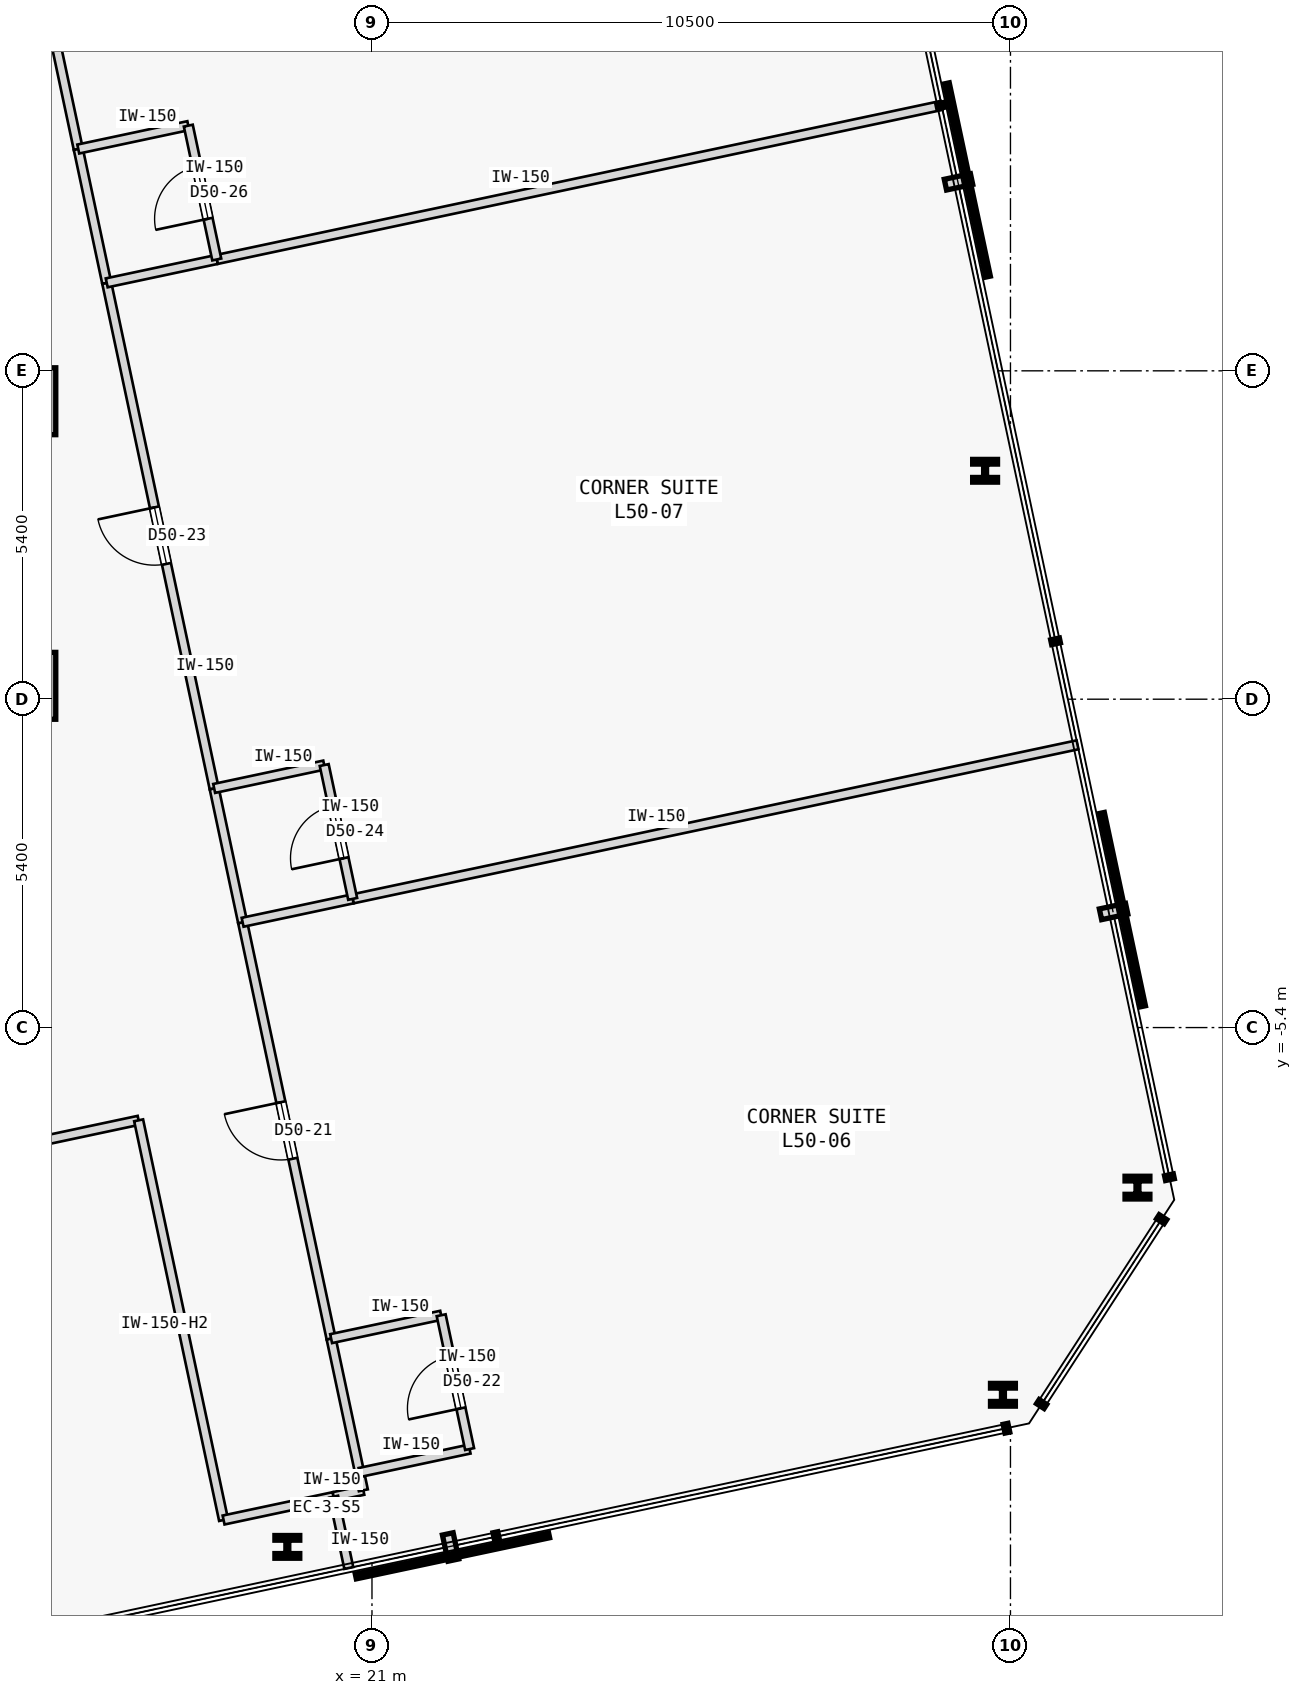
"""IFC4 building model, lengths in metres.
Left out: names, types, materials, properties, quantities, classifications, styles, units other than length and angle.
Written with IfcOpenShell. Run it as: python <this file> out.ifc"""

import sys

from ifc_helpers import new_model, si_unit, direction, frame, frame_2d, origin, origin_2d, place, context, subcontext, project, spatial, rectangle, i_section, extrude, element, fill, save


model = new_model("IFC4")
c1 = context("Model", 3, precision=1e-05, world=origin(), true_north=direction((0.0, 1.0)))
c2 = subcontext(c1, "Body", "Model", "MODEL_VIEW")
j1 = project(units=[si_unit("LENGTHUNIT", "METRE"), si_unit("PLANEANGLEUNIT", "RADIAN")], contexts=[c1])
p1 = place(None, origin())
s1 = spatial("IfcSite", under=j1, at=p1, CompositionType="ELEMENT")
p2 = place(p1, origin())
s2 = spatial("IfcBuilding", under=s1, at=p2, CompositionType="ELEMENT")
p3 = place(p2, frame((0.0, 0.0, 192.2)))
s3 = spatial("IfcBuildingStorey", under=s2, at=p3, CompositionType="ELEMENT", Elevation=192.2)
for number, where, z_axis, x_axis in (
    (1, (15.25, 4.9, 0.0), (0.0, 0.0, 1.0), (1.0, 0.0, 0.0)),
    (2, (15.25, 0.22, 0.0), (0.0, 0.0, 1.0), (1.0, 0.0, 0.0)),
):
    element("IfcColumn", number, at=place(p3, frame(where, z_axis=z_axis, x_axis=x_axis)), inside=s3, PredefinedType="COLUMN", context=c2, shape_type="SweptSolid", body=[
        extrude(rectangle(XDim=1.1, YDim=1.1, at=origin_2d()), origin(), (0.0, 0.0, 1.0), 3.4),
    ])
for number, where, z_axis, x_axis in (
    (3, (19.608, -13.94, 0.0), (0.0, 0.0, 1.0), (1.0, 0.0, 0.0)),
    (4, (31.376, -11.439, 0.0), (0.0, 0.0, 1.0), (1.0, 0.0, 0.0)),
    (5, (33.589, -8.032, 0.0), (0.0, 0.0, 1.0), (1.0, 0.0, 0.0)),
    (6, (31.083, 3.756, 0.0), (0.0, 0.0, 1.0), (1.0, 0.0, 0.0)),
):
    element("IfcColumn", number, at=place(p3, frame(where, z_axis=z_axis, x_axis=x_axis)), inside=s3, PredefinedType="COLUMN", context=c2, shape_type="SweptSolid", body=[
        extrude(i_section(OverallWidth=0.409, OverallDepth=0.374, WebThickness=0.048, FlangeThickness=0.077, FilletRadius=0.015, at=origin_2d()), origin(), (0.0, 0.0, 1.0), 3.4),
    ])
p4 = place(p3, frame((-12.862, -13.307, 0.0), z_axis=(0.0, 0.0, 1.0), x_axis=(0.97814793387, 0.207910123527, 0.0)))
e7 = element("IfcWall", 7, at=p4, inside=s3, PredefinedType="PARTITIONING", context=c2, shape_type="SweptSolid", body=[
    extrude(rectangle(XDim=30.695, YDim=0.15, at=frame_2d((15.348, 0.0))), origin(), (0.0, 0.0, 1.0), 3.175),
])
p5 = place(p4, frame((14.887, 0.0, 0.0)))
e8 = element("IfcOpeningElement", 8, at=p5, cuts=e7, PredefinedType="OPENING", context=c2, shape_type="SweptSolid", body=[
    extrude(rectangle(XDim=0.92, YDim=2.15, at=frame_2d((0.46, 1.075))), frame((0.0, 0.085, 0.0), z_axis=(0.0, -1.0, 0.0), x_axis=(1.0, 0.0, 0.0)), (0.0, 0.0, 1.0), 0.17),
])
p6 = place(p3, frame((18.56, -13.498, 0.0), z_axis=(0.0, 0.0, 1.0), x_axis=(-0.207888737749, 0.978152479278, 0.0)))
e9 = element("IfcWall", 9, at=p6, inside=s3, PredefinedType="PARTITIONING", context=c2, shape_type="SweptSolid", body=[
    extrude(rectangle(XDim=6.72, YDim=0.15, at=frame_2d((3.36, 0.0))), origin(), (0.0, 0.0, 1.0), 2.575),
])
p7 = place(p3, frame((18.56, -13.498, 0.0), z_axis=(0.0, 0.0, 1.0), x_axis=(0.978160192495, 0.207852442415, 0.0)))
e10 = element("IfcWall", 10, at=p7, inside=s3, PredefinedType="PARTITIONING", context=c2, shape_type="SweptSolid", body=[
    extrude(rectangle(XDim=1.85, YDim=0.15, at=frame_2d((0.925, 0.0))), origin(), (0.0, 0.0, 1.0), 3.175),
])
p8 = place(p3, frame((20.369, -13.114, 0.0), z_axis=(0.0, 0.0, 1.0), x_axis=(0.978143962546, 0.207928806409, 0.0)))
e11 = element("IfcWall", 11, at=p8, inside=s3, PredefinedType="PARTITIONING", context=c2, shape_type="SweptSolid", body=[
    extrude(rectangle(XDim=0.5, YDim=0.15, at=frame_2d((0.25, 0.0))), origin(), (0.0, 0.0, 1.0), 3.175),
])
p9 = place(p3, frame((20.858, -13.01, 0.0), z_axis=(0.0, 0.0, 1.0), x_axis=(-0.208306395052, 0.978063620518, 0.0)))
e12 = element("IfcWall", 12, at=p9, inside=s3, PredefinedType="PARTITIONING", context=c2, shape_type="SweptSolid", body=[
    extrude(rectangle(XDim=0.3, YDim=0.15, at=frame_2d((0.15, 0.0))), origin(), (0.0, 0.0, 1.0), 3.175),
])
p10 = place(p3, frame((20.328, -10.515, 0.0), z_axis=(0.0, 0.0, 1.0), x_axis=(-0.207906726269, 0.978148655968, 0.0)))
e13 = element("IfcWall", 13, at=p10, inside=s3, PredefinedType="PARTITIONING", context=c2, shape_type="SweptSolid", body=[
    extrude(rectangle(XDim=7.0, YDim=0.15, at=frame_2d((3.5, 0.0))), origin(), (0.0, 0.0, 1.0), 3.175),
])
p11 = place(p10, frame((3.025, 0.0, 0.0)))
e14 = element("IfcOpeningElement", 14, at=p11, cuts=e13, PredefinedType="OPENING", context=c2, shape_type="SweptSolid", body=[
    extrude(rectangle(XDim=0.95, YDim=2.15, at=frame_2d((0.475, 1.075))), frame((0.0, 0.085, 0.0), z_axis=(0.0, -1.0, 0.0), x_axis=(1.0, 0.0, 0.0)), (0.0, 0.0, 1.0), 0.17),
])
p12 = place(p3, frame((20.796, -12.716, 0.0), z_axis=(0.0, 0.0, 1.0), x_axis=(-0.207891197838, 0.978151956427, 0.0)))
e15 = element("IfcWall", 15, at=p12, inside=s3, PredefinedType="PARTITIONING", context=c2, shape_type="SweptSolid", body=[
    extrude(rectangle(XDim=2.25, YDim=0.15, at=frame_2d((1.125, 0.0))), origin(), (0.0, 0.0, 1.0), 3.175),
])
p13 = place(p3, frame((18.405, -1.468, 0.0), z_axis=(0.0, 0.0, 1.0), x_axis=(-0.207888984761, 0.97815242678, 0.0)))
e16 = element("IfcWall", 16, at=p13, inside=s3, PredefinedType="PARTITIONING", context=c2, shape_type="SweptSolid", body=[
    extrude(rectangle(XDim=8.5, YDim=0.15, at=frame_2d((4.25, 0.0))), origin(), (0.0, 0.0, 1.0), 3.175),
])
p14 = place(p13, frame((3.775, 0.0, 0.0)))
e17 = element("IfcOpeningElement", 17, at=p14, cuts=e16, PredefinedType="OPENING", context=c2, shape_type="SweptSolid", body=[
    extrude(rectangle(XDim=0.95, YDim=2.15, at=frame_2d((0.475, 1.075))), frame((0.0, 0.085, 0.0), z_axis=(0.0, -1.0, 0.0), x_axis=(1.0, 0.0, 0.0)), (0.0, 0.0, 1.0), 0.17),
])
p15 = place(p3, frame((18.873, -3.668, 0.0), z_axis=(0.0, 0.0, 1.0), x_axis=(-0.208017083936, 0.9781251928, 0.0)))
e18 = element("IfcWall", 18, at=p15, inside=s3, PredefinedType="PARTITIONING", context=c2, shape_type="SweptSolid", body=[
    extrude(rectangle(XDim=2.25, YDim=0.15, at=frame_2d((1.125, 0.0))), origin(), (0.0, 0.0, 1.0), 3.175),
])
p16 = place(p3, frame((16.17, 9.047, 0.0), z_axis=(0.0, 0.0, 1.0), x_axis=(-0.2079164651, 0.978146585917, 0.0)))
e19 = element("IfcWall", 19, at=p16, inside=s3, PredefinedType="PARTITIONING", context=c2, shape_type="SweptSolid", body=[
    extrude(rectangle(XDim=8.5, YDim=0.15, at=frame_2d((4.25, 0.0))), origin(), (0.0, 0.0, 1.0), 3.175),
])
p17 = place(p16, frame((3.775, 0.0, 0.0)))
e20 = element("IfcOpeningElement", 20, at=p17, cuts=e19, PredefinedType="OPENING", context=c2, shape_type="SweptSolid", body=[
    extrude(rectangle(XDim=0.95, YDim=2.15, at=frame_2d((0.475, 1.075))), frame((0.0, 0.085, 0.0), z_axis=(0.0, -1.0, 0.0), x_axis=(1.0, 0.0, 0.0)), (0.0, 0.0, 1.0), 0.17),
])
p18 = place(p3, frame((16.638, 6.847, 0.0), z_axis=(0.0, 0.0, 1.0), x_axis=(-0.207913264065, 0.978147266328, 0.0)))
e21 = element("IfcWall", 21, at=p18, inside=s3, PredefinedType="PARTITIONING", context=c2, shape_type="SweptSolid", body=[
    extrude(rectangle(XDim=2.25, YDim=0.15, at=frame_2d((1.125, 0.0))), origin(), (0.0, 0.0, 1.0), 3.175),
])
p19 = place(p3, frame((20.619, -14.288, 0.0), z_axis=(0.0, 0.0, 1.0), x_axis=(-0.207917150959, 0.978146440129, 0.0)))
e22 = element("IfcWall", 22, at=p19, inside=s3, PredefinedType="PARTITIONING", context=c2, shape_type="SweptSolid", body=[
    extrude(rectangle(XDim=1.2, YDim=0.15, at=frame_2d((0.6, 0.0))), origin(), (0.0, 0.0, 1.0), 3.175),
])
for number, where, z_axis, x_axis in (
    (23, (20.796, -12.716, 0.0), (0.0, 0.0, 1.0), (0.978, 0.208, 0.0)),
    (24, (20.328, -10.515, 0.0), (0.0, 0.0, 1.0), (0.978, 0.208, 0.0)),
):
    element("IfcWall", number, at=place(p3, frame(where, z_axis=z_axis, x_axis=x_axis)), inside=s3, PredefinedType="PARTITIONING", context=c2, shape_type="SweptSolid", body=[
        extrude(rectangle(XDim=1.85, YDim=0.15, at=frame_2d((0.925, 0.0))), origin(), (0.0, 0.0, 1.0), 3.175),
    ])
p20 = place(p3, frame((22.605, -12.332, 0.0), z_axis=(0.0, 0.0, 1.0), x_axis=(-0.207891197838, 0.978151956427, 0.0)))
e25 = element("IfcWall", 25, at=p20, inside=s3, PredefinedType="PARTITIONING", context=c2, shape_type="SweptSolid", body=[
    extrude(rectangle(XDim=2.25, YDim=0.15, at=frame_2d((1.125, 0.0))), origin(), (0.0, 0.0, 1.0), 3.175),
])
p21 = place(p20, frame((0.685, 0.0, 0.0)))
e26 = element("IfcOpeningElement", 26, at=p21, cuts=e25, PredefinedType="OPENING", context=c2, shape_type="SweptSolid", body=[
    extrude(rectangle(XDim=0.88, YDim=2.15, at=frame_2d((0.44, 1.075))), frame((0.0, 0.085, 0.0), z_axis=(0.0, -1.0, 0.0), x_axis=(1.0, 0.0, 0.0)), (0.0, 0.0, 1.0), 0.17),
])
p22 = place(p3, frame((20.682, -3.284, 0.0), z_axis=(0.0, 0.0, 1.0), x_axis=(0.97814556055, 0.207921288896, 0.0)))
e27 = element("IfcWall", 27, at=p22, inside=s3, PredefinedType="PARTITIONING", context=c2, shape_type="SweptSolid", body=[
    extrude(rectangle(XDim=12.187, YDim=0.15, at=frame_2d((6.094, 0.0))), origin(), (0.0, 0.0, 1.0), 3.175),
])
p23 = place(p3, frame((18.873, -3.668, 0.0), z_axis=(0.0, 0.0, 1.0), x_axis=(0.978160192495, 0.207852442415, 0.0)))
e28 = element("IfcWall", 28, at=p23, inside=s3, PredefinedType="PARTITIONING", context=c2, shape_type="SweptSolid", body=[
    extrude(rectangle(XDim=1.85, YDim=0.15, at=frame_2d((0.925, 0.0))), origin(), (0.0, 0.0, 1.0), 3.175),
])
p24 = place(p3, frame((18.405, -1.468, 0.0), z_axis=(0.0, 0.0, 1.0), x_axis=(0.978139061018, 0.207951862966, 0.0)))
e29 = element("IfcWall", 29, at=p24, inside=s3, PredefinedType="PARTITIONING", context=c2, shape_type="SweptSolid", body=[
    extrude(rectangle(XDim=1.85, YDim=0.15, at=frame_2d((0.925, 0.0))), origin(), (0.0, 0.0, 1.0), 3.175),
])
p25 = place(p3, frame((20.682, -3.284, 0.0), z_axis=(0.0, 0.0, 1.0), x_axis=(-0.207891197838, 0.978151956427, 0.0)))
e30 = element("IfcWall", 30, at=p25, inside=s3, PredefinedType="PARTITIONING", context=c2, shape_type="SweptSolid", body=[
    extrude(rectangle(XDim=2.25, YDim=0.15, at=frame_2d((1.125, 0.0))), origin(), (0.0, 0.0, 1.0), 3.175),
])
p26 = place(p25, frame((0.685, 0.0, 0.0)))
e31 = element("IfcOpeningElement", 31, at=p26, cuts=e30, PredefinedType="OPENING", context=c2, shape_type="SweptSolid", body=[
    extrude(rectangle(XDim=0.88, YDim=2.15, at=frame_2d((0.44, 1.075))), frame((0.0, 0.085, 0.0), z_axis=(0.0, -1.0, 0.0), x_axis=(1.0, 0.0, 0.0)), (0.0, 0.0, 1.0), 0.17),
])
p27 = place(p3, frame((18.447, 7.231, 0.0), z_axis=(0.0, 0.0, 1.0), x_axis=(0.978149634612, 0.207902121941, 0.0)))
e32 = element("IfcWall", 32, at=p27, inside=s3, PredefinedType="PARTITIONING", context=c2, shape_type="SweptSolid", body=[
    extrude(rectangle(XDim=12.187, YDim=0.15, at=frame_2d((6.094, 0.0))), origin(), (0.0, 0.0, 1.0), 3.175),
])
p28 = place(p3, frame((16.638, 6.847, 0.0), z_axis=(0.0, 0.0, 1.0), x_axis=(0.978160192495, 0.207852442415, 0.0)))
e33 = element("IfcWall", 33, at=p28, inside=s3, PredefinedType="PARTITIONING", context=c2, shape_type="SweptSolid", body=[
    extrude(rectangle(XDim=1.85, YDim=0.15, at=frame_2d((0.925, 0.0))), origin(), (0.0, 0.0, 1.0), 3.175),
])
p29 = place(p3, frame((16.17, 9.047, 0.0), z_axis=(0.0, 0.0, 1.0), x_axis=(0.978133353907, 0.20797870558, 0.0)))
e34 = element("IfcWall", 34, at=p29, inside=s3, PredefinedType="PARTITIONING", context=c2, shape_type="SweptSolid", body=[
    extrude(rectangle(XDim=1.85, YDim=0.15, at=frame_2d((0.925, 0.0))), origin(), (0.0, 0.0, 1.0), 3.175),
])
p30 = place(p3, frame((18.447, 7.231, 0.0), z_axis=(0.0, 0.0, 1.0), x_axis=(-0.207891197838, 0.978151956427, 0.0)))
e35 = element("IfcWall", 35, at=p30, inside=s3, PredefinedType="PARTITIONING", context=c2, shape_type="SweptSolid", body=[
    extrude(rectangle(XDim=2.25, YDim=0.15, at=frame_2d((1.125, 0.0))), origin(), (0.0, 0.0, 1.0), 3.175),
])
p31 = place(p30, frame((0.685, 0.0, 0.0)))
e36 = element("IfcOpeningElement", 36, at=p31, cuts=e35, PredefinedType="OPENING", context=c2, shape_type="SweptSolid", body=[
    extrude(rectangle(XDim=0.88, YDim=2.15, at=frame_2d((0.44, 1.075))), frame((0.0, 0.085, 0.0), z_axis=(0.0, -1.0, 0.0), x_axis=(1.0, 0.0, 0.0)), (0.0, 0.0, 1.0), 0.17),
])
p32 = place(p11, origin())
e37 = element("IfcDoor", 37, at=p32, inside=s3, OperationType="SINGLE_SWING_RIGHT", PredefinedType="DOOR", context=c2, shape_type="SweptSolid", body=[
    extrude(rectangle(XDim=0.95, YDim=2.15, at=frame_2d((0.475, 1.075))), frame((0.0, 0.025, 0.0), z_axis=(0.0, -1.0, 0.0), x_axis=(1.0, 0.0, 0.0)), (0.0, 0.0, 1.0), 0.05),
])
fill(e14, e37)
p33 = place(p21, origin())
e38 = element("IfcDoor", 38, at=p33, inside=s3, OperationType="SINGLE_SWING_LEFT", PredefinedType="DOOR", context=c2, shape_type="SweptSolid", body=[
    extrude(rectangle(XDim=0.88, YDim=2.15, at=frame_2d((0.44, 1.075))), frame((0.0, 0.025, 0.0), z_axis=(0.0, -1.0, 0.0), x_axis=(1.0, 0.0, 0.0)), (0.0, 0.0, 1.0), 0.05),
])
fill(e26, e38)
p34 = place(p14, origin())
e39 = element("IfcDoor", 39, at=p34, inside=s3, OperationType="SINGLE_SWING_RIGHT", PredefinedType="DOOR", context=c2, shape_type="SweptSolid", body=[
    extrude(rectangle(XDim=0.95, YDim=2.15, at=frame_2d((0.475, 1.075))), frame((0.0, 0.025, 0.0), z_axis=(0.0, -1.0, 0.0), x_axis=(1.0, 0.0, 0.0)), (0.0, 0.0, 1.0), 0.05),
])
fill(e17, e39)
p35 = place(p26, origin())
e40 = element("IfcDoor", 40, at=p35, inside=s3, OperationType="SINGLE_SWING_LEFT", PredefinedType="DOOR", context=c2, shape_type="SweptSolid", body=[
    extrude(rectangle(XDim=0.88, YDim=2.15, at=frame_2d((0.44, 1.075))), frame((0.0, 0.025, 0.0), z_axis=(0.0, -1.0, 0.0), x_axis=(1.0, 0.0, 0.0)), (0.0, 0.0, 1.0), 0.05),
])
fill(e31, e40)
p36 = place(p31, origin())
e41 = element("IfcDoor", 41, at=p36, inside=s3, OperationType="SINGLE_SWING_LEFT", PredefinedType="DOOR", context=c2, shape_type="SweptSolid", body=[
    extrude(rectangle(XDim=0.88, YDim=2.15, at=frame_2d((0.44, 1.075))), frame((0.0, 0.025, 0.0), z_axis=(0.0, -1.0, 0.0), x_axis=(1.0, 0.0, 0.0)), (0.0, 0.0, 1.0), 0.05),
])
fill(e36, e41)
save(model, sys.argv[1])
